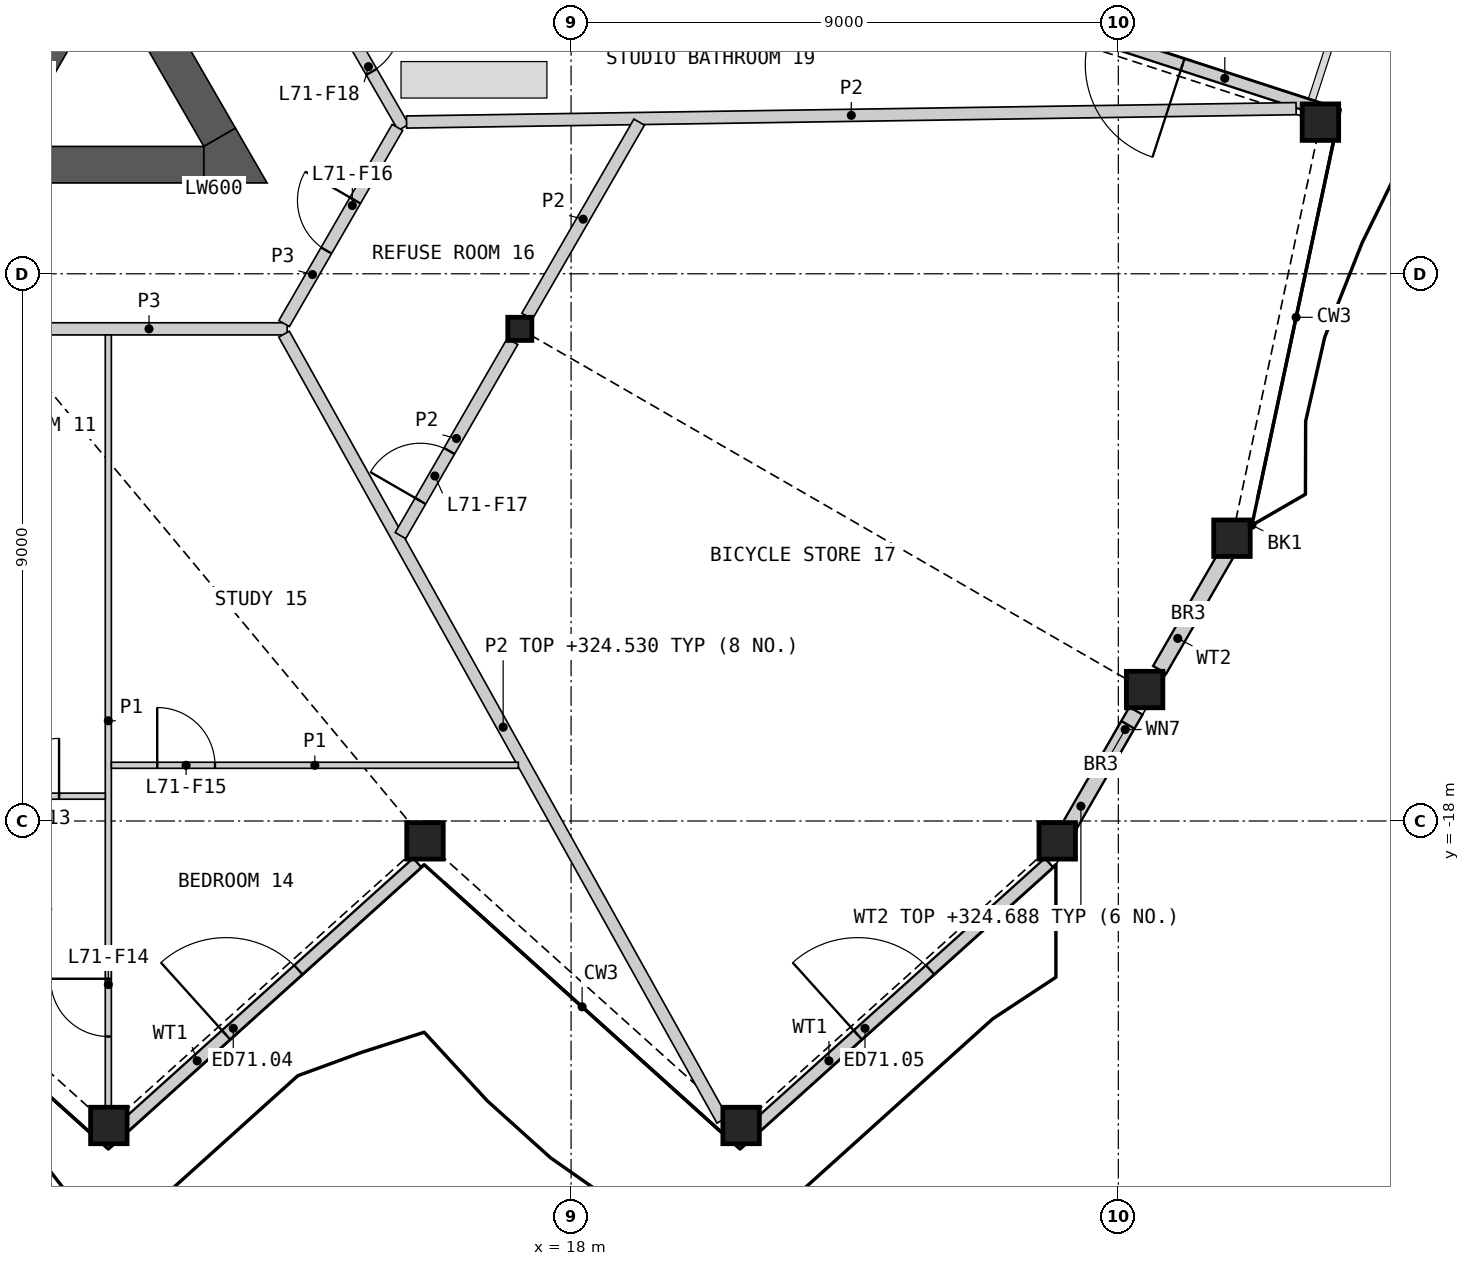
"""IFC4 building model, lengths in metres.
Left out: names, types, materials, properties, quantities, classifications, styles, units other than length and angle.
Written with IfcOpenShell. Run it as: python <this file> out.ifc"""

import sys

from ifc_helpers import new_model, si_unit, direction, frame, frame_2d, origin, origin_2d, place, context, subcontext, project, spatial, polyline, rectangle, hollow_rectangle, i_section, outline, extrude, element, fill, save


model = new_model("IFC4")
c1 = context("Model", 3, precision=1e-05, world=origin(), true_north=direction((0.0, 1.0)))
c2 = subcontext(c1, "Body", "Model", "MODEL_VIEW")
j1 = project(units=[si_unit("LENGTHUNIT", "METRE"), si_unit("PLANEANGLEUNIT", "RADIAN")], contexts=[c1])
p1 = place(None, origin())
s1 = spatial("IfcSite", under=j1, at=p1, CompositionType="ELEMENT")
p2 = place(p1, origin())
s2 = spatial("IfcBuilding", under=s1, at=p2, CompositionType="ELEMENT")
p3 = place(p2, frame((0.0, 0.0, 322.2)))
s3 = spatial("IfcBuildingStorey", under=s2, at=p3, CompositionType="ELEMENT", Elevation=322.2)
for number, where, z_axis, x_axis in (
    (1, (10.398, -23.008, 0.0), (0.0, 0.0, 1.0), (1.0, 0.0, 0.0)),
    (2, (15.597, -18.327, 0.0), (0.0, 0.0, 1.0), (1.0, 0.0, 0.0)),
    (3, (20.796, -23.008, 0.0), (0.0, 0.0, 1.0), (1.0, 0.0, 0.0)),
    (4, (25.995, -18.327, 0.0), (0.0, 0.0, 1.0), (1.0, 0.0, 0.0)),
    (5, (27.432, -15.838, 0.0), (0.0, 0.0, 1.0), (1.0, 0.0, 0.0)),
    (6, (28.869, -13.349, 0.0), (0.0, 0.0, 1.0), (1.0, 0.0, 0.0)),
    (7, (30.324, -6.506, 0.0), (0.0, 0.0, 1.0), (1.0, 0.0, 0.0)),
):
    element("IfcColumn", number, at=place(p3, frame(where, z_axis=z_axis, x_axis=x_axis)), inside=s3, PredefinedType="COLUMN", context=c2, shape_type="SweptSolid", body=[
        extrude(hollow_rectangle(XDim=0.6, YDim=0.6, WallThickness=0.04, at=origin_2d()), origin(), (0.0, 0.0, 1.0), 3.4),
    ])
p4 = place(p3, frame((17.157, -9.906, 0.0), z_axis=(0.0, 0.0, 1.0), x_axis=(1.0, 0.0, 0.0)))
e8 = element("IfcColumn", 8, at=p4, inside=s3, PredefinedType="COLUMN", context=c2, shape_type="SweptSolid", body=[
    extrude(i_section(OverallWidth=0.396, OverallDepth=0.381, WebThickness=0.019, FlangeThickness=0.03, at=origin_2d()), origin(), (0.0, 0.0, 1.0), 3.4),
])
p5 = place(p3, frame((10.645, -23.031, 0.0), z_axis=(0.0, 0.0, 1.0), x_axis=(0.743138937876, 0.669137145145, 0.0)))
e9 = element("IfcWall", 9, at=p5, inside=s3, PredefinedType="SOLIDWALL", context=c2, shape_type="SweptSolid", body=[
    extrude(rectangle(XDim=6.493, YDim=0.2, at=frame_2d((3.246, 0.0))), origin(), (0.0, 0.0, 1.0), 2.488),
])
p6 = place(p5, frame((2.261, 0.0, 0.0)))
e10 = element("IfcOpeningElement", 10, at=p6, cuts=e9, PredefinedType="OPENING", context=c2, shape_type="SweptSolid", body=[
    extrude(rectangle(XDim=1.6, YDim=2.25, at=frame_2d((0.8, 1.125))), frame((0.0, 0.11, 0.0), z_axis=(0.0, -1.0, 0.0), x_axis=(1.0, 0.0, 0.0)), (0.0, 0.0, 1.0), 0.22),
])
p7 = place(p3, frame((21.034, -23.031, 0.0), z_axis=(0.0, 0.0, 1.0), x_axis=(0.743138937876, 0.669137145145, 0.0)))
e11 = element("IfcWall", 11, at=p7, inside=s3, PredefinedType="SOLIDWALL", context=c2, shape_type="SweptSolid", body=[
    extrude(rectangle(XDim=6.493, YDim=0.2, at=frame_2d((3.246, 0.0))), origin(), (0.0, 0.0, 1.0), 2.488),
])
p8 = place(p7, frame((2.261, 0.0, 0.0)))
e12 = element("IfcOpeningElement", 12, at=p8, cuts=e11, PredefinedType="OPENING", context=c2, shape_type="SweptSolid", body=[
    extrude(rectangle(XDim=1.6, YDim=2.25, at=frame_2d((0.8, 1.125))), frame((0.0, 0.11, 0.0), z_axis=(0.0, -1.0, 0.0), x_axis=(1.0, 0.0, 0.0)), (0.0, 0.0, 1.0), 0.22),
])
p9 = place(p3, frame((26.082, -18.28, 0.0), z_axis=(0.0, 0.0, 1.0), x_axis=(0.50001992892, 0.866013897511, 0.0)))
e13 = element("IfcWall", 13, at=p9, inside=s3, PredefinedType="SOLIDWALL", context=c2, shape_type="SweptSolid", body=[
    extrude(rectangle(XDim=2.416, YDim=0.25, at=frame_2d((1.208, 0.0))), origin(), (0.0, 0.0, 1.0), 2.488),
])
p10 = place(p9, frame((1.25, 0.0, 1.6)))
e14 = element("IfcOpeningElement", 14, at=p10, cuts=e13, PredefinedType="OPENING", context=c2, shape_type="SweptSolid", body=[
    extrude(rectangle(XDim=0.9, YDim=0.6, at=frame_2d((0.45, 0.3))), frame((0.0, 0.135, 0.0), z_axis=(0.0, -1.0, 0.0), x_axis=(1.0, 0.0, 0.0)), (0.0, 0.0, 1.0), 0.27),
])
p11 = place(p3, frame((27.68, -15.513, 0.0), z_axis=(0.0, 0.0, 1.0), x_axis=(0.499982446489, 0.866035538072, 0.0)))
e15 = element("IfcWall", 15, at=p11, inside=s3, PredefinedType="SOLIDWALL", context=c2, shape_type="SweptSolid", body=[
    extrude(rectangle(XDim=2.384, YDim=0.25, at=frame_2d((1.192, 0.0))), origin(), (0.0, 0.0, 1.0), 2.488),
])
p12 = place(p3, frame((30.207, -6.258, 0.0), z_axis=(0.0, 0.0, 1.0), x_axis=(-0.951056631566, 0.309016639608, 0.0)))
e16 = element("IfcWall", 16, at=p12, inside=s3, PredefinedType="SOLIDWALL", context=c2, shape_type="SweptSolid", body=[
    extrude(rectangle(XDim=6.122, YDim=0.2, at=frame_2d((3.061, 0.0))), origin(), (0.0, 0.0, 1.0), 2.488),
])
p13 = place(p12, frame((2.261, 0.0, 0.0)))
e17 = element("IfcOpeningElement", 17, at=p13, cuts=e16, PredefinedType="OPENING", context=c2, shape_type="SweptSolid", body=[
    extrude(rectangle(XDim=1.6, YDim=2.25, at=frame_2d((0.8, 1.125))), frame((0.0, 0.11, 0.0), z_axis=(0.0, -1.0, 0.0), x_axis=(1.0, 0.0, 0.0)), (0.0, 0.0, 1.0), 0.22),
])
p14 = place(p3, origin())
e18 = element("IfcWall", 18, at=p14, inside=s3, PredefinedType="SHEAR", context=c2, shape_type="SweptSolid", body=[
    extrude(outline(polyline([(8.83, -6.881), (10.374, -4.206), (10.032, -4.298), (8.738, -6.539), (8.83, -6.881)])), origin(), (0.0, 0.0, 1.0), 3.1),
])
p15 = place(p3, frame((-4.892, -7.206, 0.0), z_axis=(0.0, 0.0, 1.0), x_axis=(1.0, 0.0, 0.0)))
e19 = element("IfcWall", 19, at=p15, inside=s3, PredefinedType="SHEAR", context=c2, shape_type="SweptSolid", body=[
    extrude(rectangle(XDim=16.853, YDim=0.6, at=frame_2d((8.426, 0.0))), origin(), (0.0, 0.0, 1.0), 3.1),
])
p16 = place(p3, frame((12.221, -6.756, 0.0), z_axis=(0.0, 0.0, 1.0), x_axis=(-0.50000604952, 0.866021911064, 0.0)))
e20 = element("IfcWall", 20, at=p16, inside=s3, PredefinedType="SHEAR", context=c2, shape_type="SweptSolid", body=[
    extrude(rectangle(XDim=4.869, YDim=0.6, at=frame_2d((2.434, 0.0))), origin(), (0.0, 0.0, 1.0), 3.1),
])
p17 = place(p3, origin())
e21 = element("IfcWall", 21, at=p17, inside=s3, PredefinedType="SHEAR", context=c2, shape_type="SweptSolid", body=[
    extrude(outline(polyline([(11.961, -7.506), (11.961, -6.906), (12.48, -6.606), (13.0, -7.506), (11.961, -7.506)])), origin(), (0.0, 0.0, 1.0), 3.1),
])
p18 = place(p3, frame((8.786, -9.906, 0.0), z_axis=(0.0, 0.0, 1.0), x_axis=(1.0, 0.0, 0.0)))
e22 = element("IfcWall", 22, at=p18, inside=s3, PredefinedType="PARTITIONING", context=c2, shape_type="SweptSolid", body=[
    extrude(rectangle(XDim=4.545, YDim=0.2, at=frame_2d((2.272, 0.0))), origin(), (0.0, 0.0, 1.0), 3.1),
])
p19 = place(p3, frame((12.988, -2.684, 0.0), z_axis=(0.0, 0.0, 1.0), x_axis=(0.49999094734, -0.866030630277, 0.0)))
e23 = element("IfcWall", 23, at=p19, inside=s3, PredefinedType="PARTITIONING", context=c2, shape_type="SweptSolid", body=[
    extrude(rectangle(XDim=4.513, YDim=0.2, at=frame_2d((2.256, 0.0))), origin(), (0.0, 0.0, 1.0), 3.1),
])
p20 = place(p19, frame((2.459, 0.0, 0.0)))
e24 = element("IfcOpeningElement", 24, at=p20, cuts=e23, PredefinedType="OPENING", context=c2, shape_type="SweptSolid", body=[
    extrude(rectangle(XDim=1.0, YDim=2.1, at=frame_2d((0.5, 1.05))), frame((0.0, 0.11, 0.0), z_axis=(0.0, -1.0, 0.0), x_axis=(1.0, 0.0, 0.0)), (0.0, 0.0, 1.0), 0.22),
])
p21 = place(p3, frame((13.281, -9.819, 0.0), z_axis=(0.0, 0.0, 1.0), x_axis=(0.499958791762, 0.866049194065, 0.0)))
e25 = element("IfcWall", 25, at=p21, inside=s3, PredefinedType="PARTITIONING", context=c2, shape_type="SweptSolid", body=[
    extrude(rectangle(XDim=3.726, YDim=0.2, at=frame_2d((1.863, 0.0))), origin(), (0.0, 0.0, 1.0), 3.1),
])
p22 = place(p21, frame((1.388, 0.0, 0.0)))
e26 = element("IfcOpeningElement", 26, at=p22, cuts=e25, PredefinedType="OPENING", context=c2, shape_type="SweptSolid", body=[
    extrude(rectangle(XDim=0.95, YDim=2.1, at=frame_2d((0.475, 1.05))), frame((0.0, 0.11, 0.0), z_axis=(0.0, -1.0, 0.0), x_axis=(1.0, 0.0, 0.0)), (0.0, 0.0, 1.0), 0.22),
])
p23 = place(p3, frame((13.28, -9.993, 0.0), z_axis=(0.0, 0.0, 1.0), x_axis=(0.486918292843, -0.873447523378, 0.0)))
e27 = element("IfcWall", 27, at=p23, inside=s3, PredefinedType="PARTITIONING", context=c2, shape_type="SweptSolid", body=[
    extrude(rectangle(XDim=14.801, YDim=0.2, at=frame_2d((7.4, 0.0))), origin(), (0.0, 0.0, 1.0), 2.33),
])
p24 = place(p3, frame((15.294, -6.504, 0.0), z_axis=(0.0, 0.0, 1.0), x_axis=(0.999886982846, 0.015034012608, 0.0)))
e28 = element("IfcWall", 28, at=p24, inside=s3, PredefinedType="PARTITIONING", context=c2, shape_type="SweptSolid", body=[
    extrude(rectangle(XDim=14.632, YDim=0.2, at=frame_2d((7.316, 0.0))), origin(), (0.0, 0.0, 1.0), 2.33),
])
p25 = place(p3, frame((15.194, -13.306, 0.0), z_axis=(0.0, 0.0, 1.0), x_axis=(0.50002820729, 0.866009117685, 0.0)))
e29 = element("IfcWall", 29, at=p25, inside=s3, PredefinedType="PARTITIONING", context=c2, shape_type="SweptSolid", body=[
    extrude(rectangle(XDim=3.686, YDim=0.2, at=frame_2d((1.843, 0.0))), origin(), (0.0, 0.0, 1.0), 2.33),
])
p26 = place(p25, frame((0.656, 0.0, 0.0)))
e30 = element("IfcOpeningElement", 30, at=p26, cuts=e29, PredefinedType="OPENING", context=c2, shape_type="SweptSolid", body=[
    extrude(rectangle(XDim=0.95, YDim=2.1, at=frame_2d((0.475, 1.05))), frame((0.0, 0.11, 0.0), z_axis=(0.0, -1.0, 0.0), x_axis=(1.0, 0.0, 0.0)), (0.0, 0.0, 1.0), 0.22),
])
p27 = place(p3, frame((17.277, -9.698, 0.0), z_axis=(0.0, 0.0, 1.0), x_axis=(0.499978535015, 0.866037796245, 0.0)))
e31 = element("IfcWall", 31, at=p27, inside=s3, PredefinedType="PARTITIONING", context=c2, shape_type="SweptSolid", body=[
    extrude(rectangle(XDim=3.686, YDim=0.2, at=frame_2d((1.843, 0.0))), origin(), (0.0, 0.0, 1.0), 2.33),
])
p28 = place(p3, frame((10.389, -22.698, 0.0), z_axis=(0.0, 0.0, 1.0), x_axis=(0.0, 1.0, 0.0)))
e32 = element("IfcWall", 32, at=p28, inside=s3, PredefinedType="PARTITIONING", context=c2, shape_type="SweptSolid", body=[
    extrude(rectangle(XDim=12.692, YDim=0.1, at=frame_2d((6.346, 0.0))), origin(), (0.0, 0.0, 1.0), 2.33),
])
p29 = place(p28, frame((1.153, 0.0, 0.0)))
e33 = element("IfcOpeningElement", 33, at=p29, cuts=e32, PredefinedType="OPENING", context=c2, shape_type="SweptSolid", body=[
    extrude(rectangle(XDim=0.95, YDim=2.1, at=frame_2d((0.475, 1.05))), frame((0.0, 0.06, 0.0), z_axis=(0.0, -1.0, 0.0), x_axis=(1.0, 0.0, 0.0)), (0.0, 0.0, 1.0), 0.12),
])
p30 = place(p3, frame((10.439, -17.084, 0.0), z_axis=(0.0, 0.0, 1.0), x_axis=(1.0, 0.0, 0.0)))
e34 = element("IfcWall", 34, at=p30, inside=s3, PredefinedType="PARTITIONING", context=c2, shape_type="SweptSolid", body=[
    extrude(rectangle(XDim=6.693, YDim=0.1, at=frame_2d((3.346, 0.0))), origin(), (0.0, 0.0, 1.0), 2.33),
])
p31 = place(p30, frame((0.754, 0.0, 0.0)))
e35 = element("IfcOpeningElement", 35, at=p31, cuts=e34, PredefinedType="OPENING", context=c2, shape_type="SweptSolid", body=[
    extrude(rectangle(XDim=0.95, YDim=2.1, at=frame_2d((0.475, 1.05))), frame((0.0, 0.06, 0.0), z_axis=(0.0, -1.0, 0.0), x_axis=(1.0, 0.0, 0.0)), (0.0, 0.0, 1.0), 0.12),
])
p32 = place(p3, frame((5.32, -17.592, 0.0), z_axis=(0.0, 0.0, 1.0), x_axis=(1.0, 0.0, 0.0)))
e36 = element("IfcWall", 36, at=p32, inside=s3, PredefinedType="PARTITIONING", context=c2, shape_type="SweptSolid", body=[
    extrude(rectangle(XDim=5.02, YDim=0.1, at=frame_2d((2.51, 0.0))), origin(), (0.0, 0.0, 1.0), 2.33),
])
p33 = place(p32, frame((3.31, 0.0, 0.0)))
e37 = element("IfcOpeningElement", 37, at=p33, cuts=e36, PredefinedType="OPENING", context=c2, shape_type="SweptSolid", body=[
    extrude(rectangle(XDim=0.95, YDim=2.1, at=frame_2d((0.475, 1.05))), frame((0.0, 0.06, 0.0), z_axis=(0.0, -1.0, 0.0), x_axis=(1.0, 0.0, 0.0)), (0.0, 0.0, 1.0), 0.12),
])
p34 = place(p6, origin())
e38 = element("IfcDoor", 38, at=p34, inside=s3, OperationType="DOUBLE_DOOR_SINGLE_SWING", PredefinedType="DOOR", context=c2, shape_type="SweptSolid", body=[
    extrude(rectangle(XDim=1.6, YDim=2.25, at=frame_2d((0.8, 1.125))), frame((0.0, 0.025, 0.0), z_axis=(0.0, -1.0, 0.0), x_axis=(1.0, 0.0, 0.0)), (0.0, 0.0, 1.0), 0.05),
])
fill(e10, e38)
p35 = place(p8, origin())
e39 = element("IfcDoor", 39, at=p35, inside=s3, OperationType="DOUBLE_DOOR_SINGLE_SWING", PredefinedType="DOOR", context=c2, shape_type="SweptSolid", body=[
    extrude(rectangle(XDim=1.6, YDim=2.25, at=frame_2d((0.8, 1.125))), frame((0.0, 0.025, 0.0), z_axis=(0.0, -1.0, 0.0), x_axis=(1.0, 0.0, 0.0)), (0.0, 0.0, 1.0), 0.05),
])
fill(e12, e39)
p36 = place(p10, origin())
e40 = element("IfcWindow", 40, at=p36, inside=s3, PartitioningType="SINGLE_PANEL", PredefinedType="WINDOW", context=c2, shape_type="SweptSolid", body=[
    extrude(rectangle(XDim=0.9, YDim=0.6, at=frame_2d((0.45, 0.3))), frame((0.0, 0.03, 0.0), z_axis=(0.0, -1.0, 0.0), x_axis=(1.0, 0.0, 0.0)), (0.0, 0.0, 1.0), 0.06),
])
fill(e14, e40)
p37 = place(p13, origin())
e41 = element("IfcDoor", 41, at=p37, inside=s3, OperationType="DOUBLE_DOOR_SINGLE_SWING", PredefinedType="DOOR", context=c2, shape_type="SweptSolid", body=[
    extrude(rectangle(XDim=1.6, YDim=2.25, at=frame_2d((0.8, 1.125))), frame((0.0, 0.025, 0.0), z_axis=(0.0, -1.0, 0.0), x_axis=(1.0, 0.0, 0.0)), (0.0, 0.0, 1.0), 0.05),
])
fill(e17, e41)
p38 = place(p33, origin())
e42 = element("IfcDoor", 42, at=p38, inside=s3, OperationType="SINGLE_SWING_RIGHT", PredefinedType="DOOR", context=c2, shape_type="SweptSolid", body=[
    extrude(rectangle(XDim=0.95, YDim=2.1, at=frame_2d((0.475, 1.05))), frame((0.0, 0.025, 0.0), z_axis=(0.0, -1.0, 0.0), x_axis=(1.0, 0.0, 0.0)), (0.0, 0.0, 1.0), 0.05),
])
fill(e37, e42)
p39 = place(p29, origin())
e43 = element("IfcDoor", 43, at=p39, inside=s3, OperationType="SINGLE_SWING_RIGHT", PredefinedType="DOOR", context=c2, shape_type="SweptSolid", body=[
    extrude(rectangle(XDim=0.95, YDim=2.1, at=frame_2d((0.475, 1.05))), frame((0.0, 0.025, 0.0), z_axis=(0.0, -1.0, 0.0), x_axis=(1.0, 0.0, 0.0)), (0.0, 0.0, 1.0), 0.05),
])
fill(e33, e43)
p40 = place(p31, origin())
e44 = element("IfcDoor", 44, at=p40, inside=s3, OperationType="SINGLE_SWING_LEFT", PredefinedType="DOOR", context=c2, shape_type="SweptSolid", body=[
    extrude(rectangle(XDim=0.95, YDim=2.1, at=frame_2d((0.475, 1.05))), frame((0.0, 0.025, 0.0), z_axis=(0.0, -1.0, 0.0), x_axis=(1.0, 0.0, 0.0)), (0.0, 0.0, 1.0), 0.05),
])
fill(e35, e44)
p41 = place(p22, origin())
e45 = element("IfcDoor", 45, at=p41, inside=s3, OperationType="SINGLE_SWING_RIGHT", PredefinedType="DOOR", context=c2, shape_type="SweptSolid", body=[
    extrude(rectangle(XDim=0.95, YDim=2.1, at=frame_2d((0.475, 1.05))), frame((0.0, 0.025, 0.0), z_axis=(0.0, -1.0, 0.0), x_axis=(1.0, 0.0, 0.0)), (0.0, 0.0, 1.0), 0.05),
])
fill(e26, e45)
p42 = place(p26, origin())
e46 = element("IfcDoor", 46, at=p42, inside=s3, OperationType="SINGLE_SWING_LEFT", PredefinedType="DOOR", context=c2, shape_type="SweptSolid", body=[
    extrude(rectangle(XDim=0.95, YDim=2.1, at=frame_2d((0.475, 1.05))), frame((0.0, 0.025, 0.0), z_axis=(0.0, -1.0, 0.0), x_axis=(1.0, 0.0, 0.0)), (0.0, 0.0, 1.0), 0.05),
])
fill(e30, e46)
p43 = place(p20, origin())
e47 = element("IfcDoor", 47, at=p43, inside=s3, OperationType="SINGLE_SWING_LEFT", PredefinedType="DOOR", context=c2, shape_type="SweptSolid", body=[
    extrude(rectangle(XDim=1.0, YDim=2.1, at=frame_2d((0.5, 1.05))), frame((0.0, 0.025, 0.0), z_axis=(0.0, -1.0, 0.0), x_axis=(1.0, 0.0, 0.0)), (0.0, 0.0, 1.0), 0.05),
])
fill(e24, e47)
save(model, sys.argv[1])
